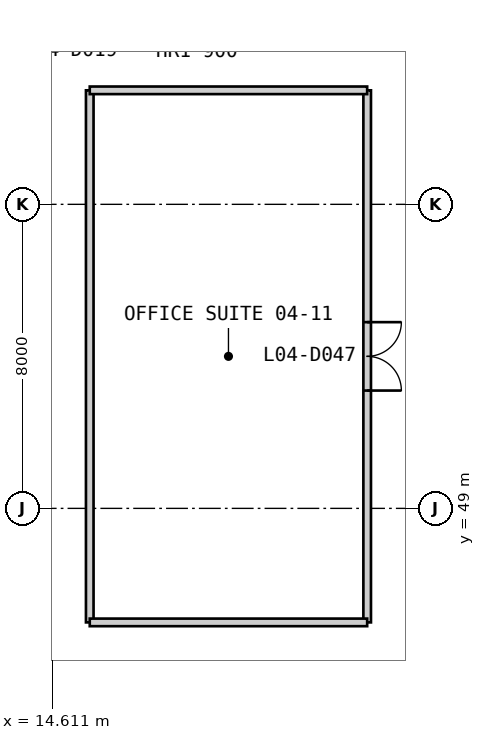
"""IFC4 building model, lengths in metres.
Left out: names, types, materials, properties, quantities, classifications, styles, units other than length and angle.
Written with IfcOpenShell. Run it as: python <this file> out.ifc"""

import sys

from ifc_helpers import new_model, si_unit, direction, frame, frame_2d, origin, place, context, subcontext, project, spatial, rectangle, extrude, element, fill, save


model = new_model("IFC4")
c1 = context("Model", 3, precision=1e-05, world=origin(), true_north=direction((0.0, 1.0)))
c2 = subcontext(c1, "Body", "Model", "MODEL_VIEW")
j1 = project(units=[si_unit("LENGTHUNIT", "METRE"), si_unit("PLANEANGLEUNIT", "RADIAN")], contexts=[c1])
p1 = place(None, origin())
s1 = spatial("IfcSite", under=j1, at=p1, CompositionType="ELEMENT")
p2 = place(p1, origin())
s2 = spatial("IfcBuilding", under=s1, at=p2, CompositionType="ELEMENT")
p3 = place(p2, frame((0.0, 0.0, 21.4)))
s3 = spatial("IfcBuildingStorey", under=s2, at=p3, CompositionType="ELEMENT", Elevation=21.4)
p4 = place(p3, frame((15.6, 46.0, 0.0), z_axis=(0.0, 0.0, 1.0), x_axis=(0.0, 1.0, 0.0)))
e1 = element("IfcWall", 1, at=p4, inside=s3, PredefinedType="PARTITIONING", context=c2, shape_type="SweptSolid", body=[
    extrude(rectangle(XDim=14.0, YDim=0.2, at=frame_2d((7.0, 0.0))), origin(), (0.0, 0.0, 1.0), 4.5),
])
p5 = place(p3, frame((22.9, 46.0, 0.0), z_axis=(0.0, 0.0, 1.0), x_axis=(0.0, 1.0, 0.0)))
e2 = element("IfcWall", 2, at=p5, inside=s3, PredefinedType="PARTITIONING", context=c2, shape_type="SweptSolid", body=[
    extrude(rectangle(XDim=14.0, YDim=0.2, at=frame_2d((7.0, 0.0))), origin(), (0.0, 0.0, 1.0), 4.5),
])
p6 = place(p5, frame((6.1, 0.0, 0.0)))
e3 = element("IfcOpeningElement", 3, at=p6, cuts=e2, PredefinedType="OPENING", context=c2, shape_type="SweptSolid", body=[
    extrude(rectangle(XDim=1.8, YDim=2.4, at=frame_2d((0.9, 1.2))), frame((0.0, 0.11, 0.0), z_axis=(0.0, -1.0, 0.0), x_axis=(1.0, 0.0, 0.0)), (0.0, 0.0, 1.0), 0.22),
])
for number, where, z_axis, x_axis in (
    (4, (15.6, 46.0, 0.0), (0.0, 0.0, 1.0), (1.0, 0.0, 0.0)),
    (5, (15.6, 60.0, 0.0), (0.0, 0.0, 1.0), (1.0, 0.0, 0.0)),
):
    element("IfcWall", number, at=place(p3, frame(where, z_axis=z_axis, x_axis=x_axis)), inside=s3, PredefinedType="PARTITIONING", context=c2, shape_type="SweptSolid", body=[
        extrude(rectangle(XDim=7.3, YDim=0.2, at=frame_2d((3.65, 0.0))), origin(), (0.0, 0.0, 1.0), 4.5),
    ])
p7 = place(p6, frame((1.8, 0.0, 0.0), z_axis=(0.0, 0.0, 1.0), x_axis=(-1.0, 0.0, 0.0)))
e6 = element("IfcDoor", 6, at=p7, inside=s3, OperationType="DOUBLE_DOOR_SINGLE_SWING", PredefinedType="DOOR", context=c2, shape_type="SweptSolid", body=[
    extrude(rectangle(XDim=1.8, YDim=2.4, at=frame_2d((0.9, 1.2))), frame((0.0, 0.025, 0.0), z_axis=(0.0, -1.0, 0.0), x_axis=(1.0, 0.0, 0.0)), (0.0, 0.0, 1.0), 0.05),
])
fill(e3, e6)
save(model, sys.argv[1])
